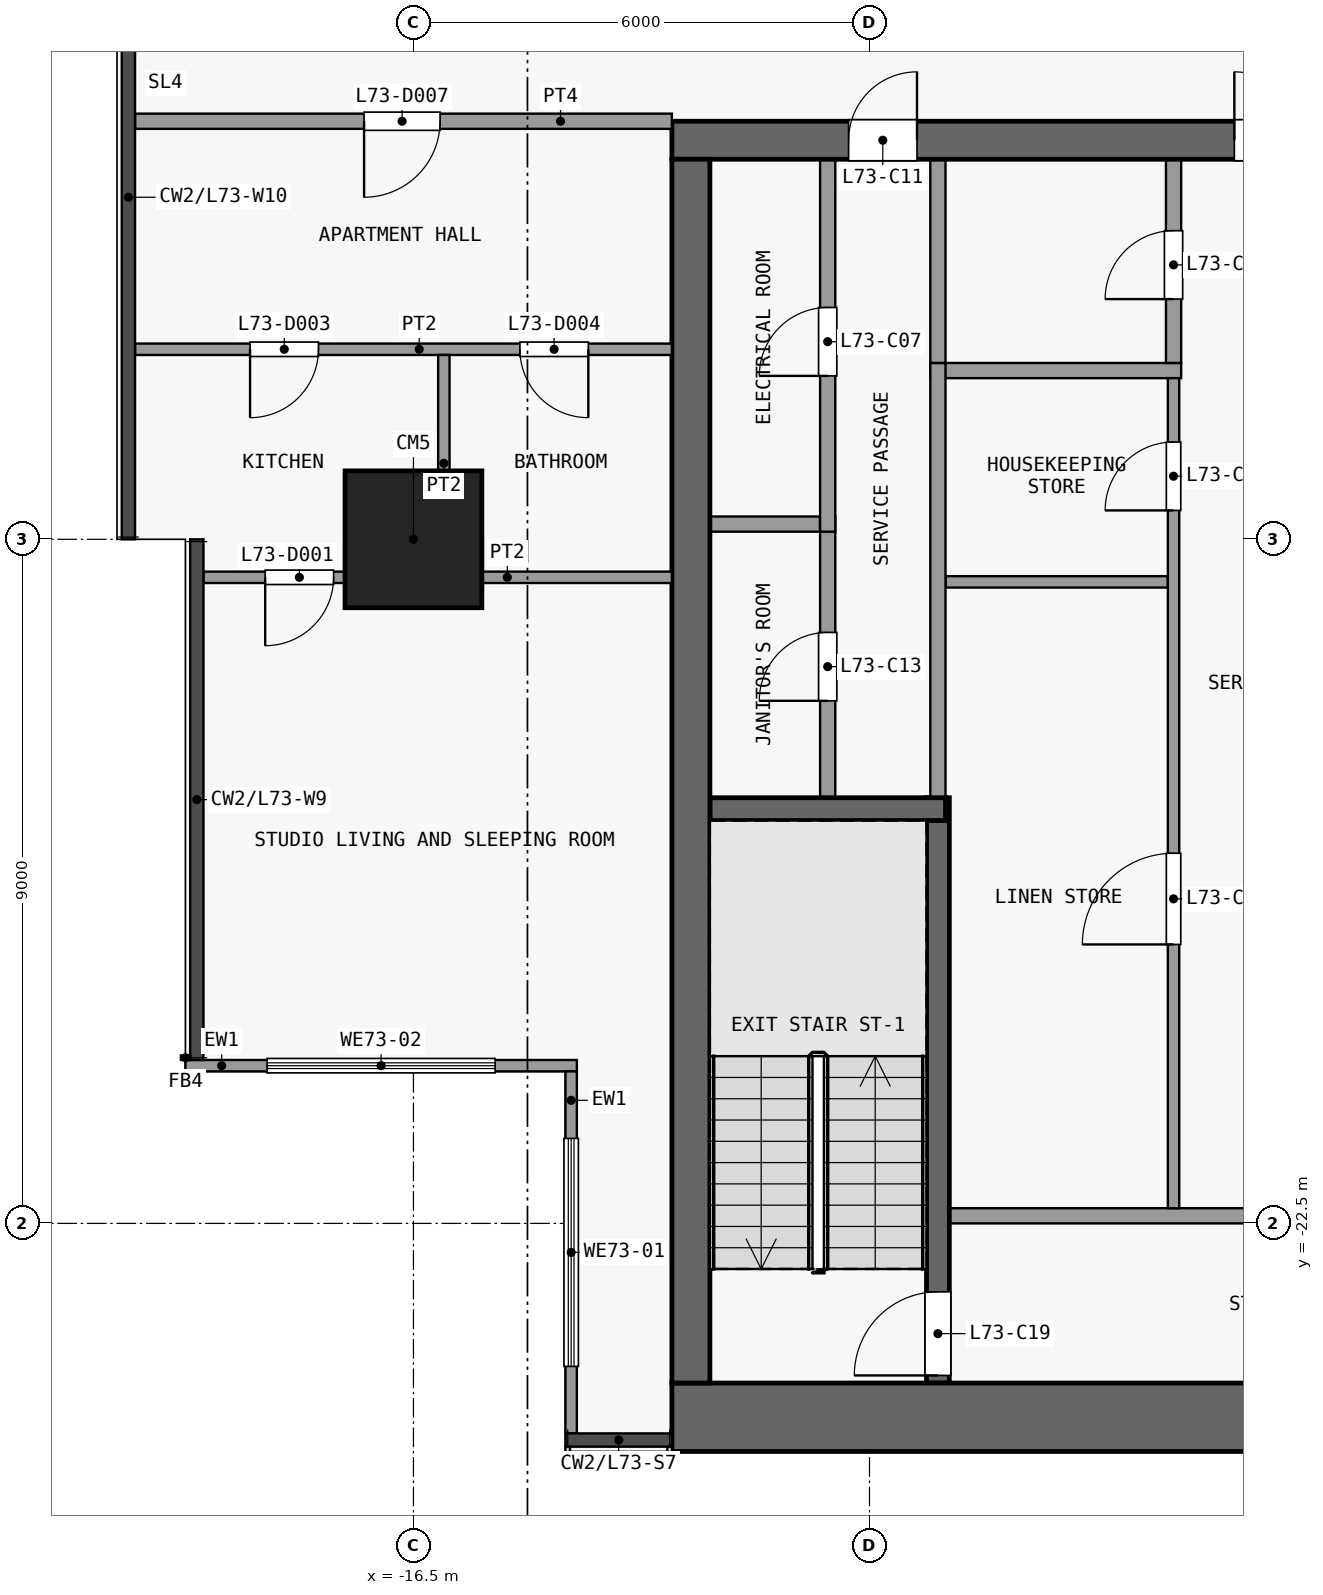
"""IFC4 building model, lengths in metres.
Left out: names, types, materials, properties, quantities, classifications, styles, units other than length and angle.
Written with IfcOpenShell. Run it as: python <this file> out.ifc"""

import sys

from ifc_helpers import new_model, si_unit, direction, frame, frame_2d, origin, origin_2d, place, context, subcontext, project, spatial, rectangle, extrude, element, fill, save


model = new_model("IFC4")
c1 = context("Model", 3, precision=1e-05, world=origin(), true_north=direction((0.0, 1.0)))
c2 = subcontext(c1, "Body", "Model", "MODEL_VIEW")
j1 = project(units=[si_unit("LENGTHUNIT", "METRE"), si_unit("PLANEANGLEUNIT", "RADIAN")], contexts=[c1])
p1 = place(None, origin())
s1 = spatial("IfcSite", under=j1, at=p1, CompositionType="ELEMENT")
p2 = place(p1, origin())
s2 = spatial("IfcBuilding", under=s1, at=p2, CompositionType="ELEMENT")
p3 = place(p2, frame((0.0, 0.0, 287.9)))
s3 = spatial("IfcBuildingStorey", under=s2, at=p3, CompositionType="ELEMENT", Elevation=287.9)
p4 = place(p3, frame((-16.5, -13.5, 0.0), z_axis=(0.0, 0.0, 1.0), x_axis=(1.0, 0.0, 0.0)))
e1 = element("IfcColumn", 1, at=p4, inside=s3, PredefinedType="COLUMN", context=c2, shape_type="SweptSolid", body=[
    extrude(rectangle(XDim=1.8, YDim=1.8, at=origin_2d()), origin(), (0.0, 0.0, 1.0), 3.6),
])
p5 = place(p3, frame((-13.1, -25.05, 0.0), z_axis=(0.0, 0.0, 1.0), x_axis=(1.0, 0.0, 0.0)))
e2 = element("IfcWall", 2, at=p5, inside=s3, PredefinedType="SHEAR", context=c2, shape_type="SweptSolid", body=[
    extrude(rectangle(XDim=26.2, YDim=0.9, at=frame_2d((13.1, 0.0))), origin(), (0.0, 0.0, 1.0), 3.3),
])
p6 = place(p3, frame((-13.1, -8.25, 0.0), z_axis=(0.0, 0.0, 1.0), x_axis=(1.0, 0.0, 0.0)))
e3 = element("IfcWall", 3, at=p6, inside=s3, PredefinedType="SHEAR", context=c2, shape_type="SweptSolid", body=[
    extrude(rectangle(XDim=26.2, YDim=0.5, at=frame_2d((13.1, 0.0))), origin(), (0.0, 0.0, 1.0), 3.3),
])
p7 = place(p6, frame((7.4, 0.0, 0.0)))
e4 = element("IfcOpeningElement", 4, at=p7, cuts=e3, PredefinedType="OPENING", context=c2, shape_type="SweptSolid", body=[
    extrude(rectangle(XDim=1.8, YDim=2.1, at=frame_2d((0.9, 1.05))), frame((0.0, 0.26, 0.0), z_axis=(0.0, -1.0, 0.0), x_axis=(1.0, 0.0, 0.0)), (0.0, 0.0, 1.0), 0.52),
])
p8 = place(p6, frame((17.0, 0.0, 0.0)))
e5 = element("IfcOpeningElement", 5, at=p8, cuts=e3, PredefinedType="OPENING", context=c2, shape_type="SweptSolid", body=[
    extrude(rectangle(XDim=1.8, YDim=2.1, at=frame_2d((0.9, 1.05))), frame((0.0, 0.26, 0.0), z_axis=(0.0, -1.0, 0.0), x_axis=(1.0, 0.0, 0.0)), (0.0, 0.0, 1.0), 0.52),
])
p9 = place(p6, frame((2.325, 0.0, 0.0)))
e6 = element("IfcOpeningElement", 6, at=p9, cuts=e3, PredefinedType="OPENING", context=c2, shape_type="SweptSolid", body=[
    extrude(rectangle(XDim=0.9, YDim=2.1, at=frame_2d((0.45, 1.05))), frame((0.0, 0.26, 0.0), z_axis=(0.0, -1.0, 0.0), x_axis=(1.0, 0.0, 0.0)), (0.0, 0.0, 1.0), 0.52),
])
p10 = place(p6, frame((22.975, 0.0, 0.0)))
e7 = element("IfcOpeningElement", 7, at=p10, cuts=e3, PredefinedType="OPENING", context=c2, shape_type="SweptSolid", body=[
    extrude(rectangle(XDim=0.9, YDim=2.1, at=frame_2d((0.45, 1.05))), frame((0.0, 0.26, 0.0), z_axis=(0.0, -1.0, 0.0), x_axis=(1.0, 0.0, 0.0)), (0.0, 0.0, 1.0), 0.52),
])
p11 = place(p3, frame((-12.85, -24.6, 0.0), z_axis=(0.0, 0.0, 1.0), x_axis=(0.0, 1.0, 0.0)))
e8 = element("IfcWall", 8, at=p11, inside=s3, PredefinedType="SHEAR", context=c2, shape_type="SweptSolid", body=[
    extrude(rectangle(XDim=16.1, YDim=0.5, at=frame_2d((8.05, 0.0))), origin(), (0.0, 0.0, 1.0), 3.3),
])
p12 = place(p3, frame((-3.25, -22.4, 0.0), z_axis=(0.0, 0.0, 1.0), x_axis=(-1.0, 0.0, 0.0)))
e9 = element("IfcWall", 9, at=p12, inside=s3, PredefinedType="PARTITIONING", context=c2, shape_type="SweptSolid", body=[
    extrude(rectangle(XDim=6.2, YDim=0.2, at=frame_2d((3.1, 0.0))), origin(), (0.0, 0.0, 1.0), 3.3),
])
p13 = place(p12, frame((0.8, 0.0, 0.0)))
e10 = element("IfcOpeningElement", 10, at=p13, cuts=e9, PredefinedType="OPENING", context=c2, shape_type="SweptSolid", body=[
    extrude(rectangle(XDim=1.5, YDim=2.1, at=frame_2d((0.75, 1.05))), frame((0.0, 0.11, 0.0), z_axis=(0.0, -1.0, 0.0), x_axis=(1.0, 0.0, 0.0)), (0.0, 0.0, 1.0), 0.22),
])
p14 = place(p3, frame((-12.6, -17.05, 0.0), z_axis=(0.0, 0.0, 1.0), x_axis=(1.0, 0.0, 0.0)))
e11 = element("IfcWall", 11, at=p14, inside=s3, PredefinedType="SHEAR", context=c2, shape_type="SweptSolid", body=[
    extrude(rectangle(XDim=3.1, YDim=0.3, at=frame_2d((1.55, 0.0))), origin(), (0.0, 0.0, 1.0), 3.3),
])
p15 = place(p3, frame((-9.5, -14.06, 0.0), z_axis=(0.0, 0.0, 1.0), x_axis=(1.0, 0.0, 0.0)))
e12 = element("IfcWall", 12, at=p15, inside=s3, PredefinedType="PARTITIONING", context=c2, shape_type="SweptSolid", body=[
    extrude(rectangle(XDim=2.925, YDim=0.15, at=frame_2d((1.462, 0.0))), origin(), (0.0, 0.0, 1.0), 3.3),
])
p16 = place(p3, frame((-12.6, -13.3, 0.0), z_axis=(0.0, 0.0, 1.0), x_axis=(1.0, 0.0, 0.0)))
e13 = element("IfcWall", 13, at=p16, inside=s3, PredefinedType="PARTITIONING", context=c2, shape_type="SweptSolid", body=[
    extrude(rectangle(XDim=1.45, YDim=0.2, at=frame_2d((0.725, 0.0))), origin(), (0.0, 0.0, 1.0), 3.3),
])
p17 = place(p3, frame((-9.7, -11.28, 0.0), z_axis=(0.0, 0.0, 1.0), x_axis=(1.0, 0.0, 0.0)))
e14 = element("IfcWall", 14, at=p17, inside=s3, PredefinedType="PARTITIONING", context=c2, shape_type="SweptSolid", body=[
    extrude(rectangle(XDim=3.3, YDim=0.2, at=frame_2d((1.65, 0.0))), origin(), (0.0, 0.0, 1.0), 3.3),
])
p18 = place(p3, frame((-11.05, -16.9, 0.0), z_axis=(0.0, 0.0, 1.0), x_axis=(0.0, 1.0, 0.0)))
e15 = element("IfcWall", 15, at=p18, inside=s3, PredefinedType="PARTITIONING", context=c2, shape_type="SweptSolid", body=[
    extrude(rectangle(XDim=3.7, YDim=0.2, at=frame_2d((1.85, 0.0))), origin(), (0.0, 0.0, 1.0), 3.3),
])
p19 = place(p18, frame((1.275, 0.0, 0.0)))
e16 = element("IfcOpeningElement", 16, at=p19, cuts=e15, PredefinedType="OPENING", context=c2, shape_type="SweptSolid", body=[
    extrude(rectangle(XDim=0.9, YDim=2.1, at=frame_2d((0.45, 1.05))), frame((0.0, 0.11, 0.0), z_axis=(0.0, -1.0, 0.0), x_axis=(1.0, 0.0, 0.0)), (0.0, 0.0, 1.0), 0.22),
])
p20 = place(p3, frame((-11.05, -13.4, 0.0), z_axis=(0.0, 0.0, 1.0), x_axis=(0.0, 1.0, 0.0)))
e17 = element("IfcWall", 17, at=p20, inside=s3, PredefinedType="PARTITIONING", context=c2, shape_type="SweptSolid", body=[
    extrude(rectangle(XDim=4.9, YDim=0.2, at=frame_2d((2.45, 0.0))), origin(), (0.0, 0.0, 1.0), 3.3),
])
p21 = place(p20, frame((2.05, 0.0, 0.0)))
e18 = element("IfcOpeningElement", 18, at=p21, cuts=e17, PredefinedType="OPENING", context=c2, shape_type="SweptSolid", body=[
    extrude(rectangle(XDim=0.9, YDim=2.1, at=frame_2d((0.45, 1.05))), frame((0.0, 0.11, 0.0), z_axis=(0.0, -1.0, 0.0), x_axis=(1.0, 0.0, 0.0)), (0.0, 0.0, 1.0), 0.22),
])
p22 = place(p3, frame((-9.6, -24.6, 0.0), z_axis=(0.0, 0.0, 1.0), x_axis=(0.0, 1.0, 0.0)))
e19 = element("IfcWall", 19, at=p22, inside=s3, PredefinedType="SHEAR", context=c2, shape_type="SweptSolid", body=[
    extrude(rectangle(XDim=7.7, YDim=0.3, at=frame_2d((3.85, 0.0))), origin(), (0.0, 0.0, 1.0), 3.3),
])
p23 = place(p22, frame((0.1, 0.0, 0.0)))
e20 = element("IfcOpeningElement", 20, at=p23, cuts=e19, PredefinedType="OPENING", context=c2, shape_type="SweptSolid", body=[
    extrude(rectangle(XDim=1.1, YDim=2.1, at=frame_2d((0.55, 1.05))), frame((0.0, 0.16, 0.0), z_axis=(0.0, -1.0, 0.0), x_axis=(1.0, 0.0, 0.0)), (0.0, 0.0, 1.0), 0.32),
])
p24 = place(p3, frame((-9.6, -16.9, 0.0), z_axis=(0.0, 0.0, 1.0), x_axis=(0.0, 1.0, 0.0)))
e21 = element("IfcWall", 21, at=p24, inside=s3, PredefinedType="PARTITIONING", context=c2, shape_type="SweptSolid", body=[
    extrude(rectangle(XDim=5.72, YDim=0.2, at=frame_2d((2.86, 0.0))), origin(), (0.0, 0.0, 1.0), 3.3),
])
p25 = place(p3, frame((-9.6, -11.18, 0.0), z_axis=(0.0, 0.0, 1.0), x_axis=(0.0, 1.0, 0.0)))
e22 = element("IfcWall", 22, at=p25, inside=s3, PredefinedType="PARTITIONING", context=c2, shape_type="SweptSolid", body=[
    extrude(rectangle(XDim=2.68, YDim=0.2, at=frame_2d((1.34, 0.0))), origin(), (0.0, 0.0, 1.0), 3.3),
])
p26 = place(p3, frame((-6.5, -22.3, 0.0), z_axis=(0.0, 0.0, 1.0), x_axis=(0.0, 1.0, 0.0)))
e23 = element("IfcWall", 23, at=p26, inside=s3, PredefinedType="PARTITIONING", context=c2, shape_type="SweptSolid", body=[
    extrude(rectangle(XDim=10.92, YDim=0.15, at=frame_2d((5.46, 0.0))), origin(), (0.0, 0.0, 1.0), 3.3),
])
p27 = place(p26, frame((3.47, 0.0, 0.0)))
e24 = element("IfcOpeningElement", 24, at=p27, cuts=e23, PredefinedType="OPENING", context=c2, shape_type="SweptSolid", body=[
    extrude(rectangle(XDim=1.2, YDim=2.1, at=frame_2d((0.6, 1.05))), frame((0.0, 0.085, 0.0), z_axis=(0.0, -1.0, 0.0), x_axis=(1.0, 0.0, 0.0)), (0.0, 0.0, 1.0), 0.17),
])
p28 = place(p26, frame((9.18, 0.0, 0.0)))
e25 = element("IfcOpeningElement", 25, at=p28, cuts=e23, PredefinedType="OPENING", context=c2, shape_type="SweptSolid", body=[
    extrude(rectangle(XDim=0.9, YDim=2.1, at=frame_2d((0.45, 1.05))), frame((0.0, 0.085, 0.0), z_axis=(0.0, -1.0, 0.0), x_axis=(1.0, 0.0, 0.0)), (0.0, 0.0, 1.0), 0.17),
])
p29 = place(p3, frame((-6.5, -11.18, 0.0), z_axis=(0.0, 0.0, 1.0), x_axis=(0.0, 1.0, 0.0)))
e26 = element("IfcWall", 26, at=p29, inside=s3, PredefinedType="PARTITIONING", context=c2, shape_type="SweptSolid", body=[
    extrude(rectangle(XDim=2.68, YDim=0.2, at=frame_2d((1.34, 0.0))), origin(), (0.0, 0.0, 1.0), 3.3),
])
p30 = place(p29, frame((0.84, 0.0, 0.0)))
e27 = element("IfcOpeningElement", 27, at=p30, cuts=e26, PredefinedType="OPENING", context=c2, shape_type="SweptSolid", body=[
    extrude(rectangle(XDim=0.9, YDim=2.1, at=frame_2d((0.45, 1.05))), frame((0.0, 0.11, 0.0), z_axis=(0.0, -1.0, 0.0), x_axis=(1.0, 0.0, 0.0)), (0.0, 0.0, 1.0), 0.22),
])
p31 = place(p3, frame((-14.425, -25.262, 0.0), z_axis=(0.0, 0.0, 1.0), x_axis=(0.0, 1.0, 0.0)))
e28 = element("IfcWall", 28, at=p31, inside=s3, PredefinedType="SOLIDWALL", context=c2, shape_type="SweptSolid", body=[
    extrude(rectangle(XDim=4.762, YDim=0.15, at=frame_2d((2.381, 0.0))), origin(), (0.0, 0.0, 1.0), 3.3),
])
p32 = place(p31, frame((0.881, 0.0, 0.9)))
e29 = element("IfcOpeningElement", 29, at=p32, cuts=e28, PredefinedType="OPENING", context=c2, shape_type="SweptSolid", body=[
    extrude(rectangle(XDim=3.0, YDim=2.4, at=frame_2d((1.5, 1.2))), frame((0.0, 0.085, 0.0), z_axis=(0.0, -1.0, 0.0), x_axis=(1.0, 0.0, 0.0)), (0.0, 0.0, 1.0), 0.17),
])
p33 = place(p3, frame((-14.35, -20.425, 0.0), z_axis=(0.0, 0.0, 1.0), x_axis=(-1.0, 0.0, 0.0)))
e30 = element("IfcWall", 30, at=p33, inside=s3, PredefinedType="SOLIDWALL", context=c2, shape_type="SweptSolid", body=[
    extrude(rectangle(XDim=5.15, YDim=0.15, at=frame_2d((2.575, 0.0))), origin(), (0.0, 0.0, 1.0), 3.3),
])
p34 = place(p33, frame((1.075, 0.0, 0.9)))
e31 = element("IfcOpeningElement", 31, at=p34, cuts=e30, PredefinedType="OPENING", context=c2, shape_type="SweptSolid", body=[
    extrude(rectangle(XDim=3.0, YDim=2.4, at=frame_2d((1.5, 1.2))), frame((0.0, 0.085, 0.0), z_axis=(0.0, -1.0, 0.0), x_axis=(1.0, 0.0, 0.0)), (0.0, 0.0, 1.0), 0.17),
])
p35 = place(p3, frame((-19.262, -14.0, 0.0), z_axis=(0.0, 0.0, 1.0), x_axis=(1.0, 0.0, 0.0)))
e32 = element("IfcWall", 32, at=p35, inside=s3, PredefinedType="PARTITIONING", context=c2, shape_type="SweptSolid", body=[
    extrude(rectangle(XDim=6.162, YDim=0.15, at=frame_2d((3.081, 0.0))), origin(), (0.0, 0.0, 1.0), 3.3),
])
p36 = place(p35, frame((0.812, 0.0, 0.0)))
e33 = element("IfcOpeningElement", 33, at=p36, cuts=e32, PredefinedType="OPENING", context=c2, shape_type="SweptSolid", body=[
    extrude(rectangle(XDim=0.9, YDim=2.1, at=frame_2d((0.45, 1.05))), frame((0.0, 0.085, 0.0), z_axis=(0.0, -1.0, 0.0), x_axis=(1.0, 0.0, 0.0)), (0.0, 0.0, 1.0), 0.17),
])
p37 = place(p3, frame((-20.163, -11.0, 0.0), z_axis=(0.0, 0.0, 1.0), x_axis=(1.0, 0.0, 0.0)))
e34 = element("IfcWall", 34, at=p37, inside=s3, PredefinedType="PARTITIONING", context=c2, shape_type="SweptSolid", body=[
    extrude(rectangle(XDim=7.062, YDim=0.15, at=frame_2d((3.531, 0.0))), origin(), (0.0, 0.0, 1.0), 3.3),
])
p38 = place(p37, frame((1.513, 0.0, 0.0)))
e35 = element("IfcOpeningElement", 35, at=p38, cuts=e34, PredefinedType="OPENING", context=c2, shape_type="SweptSolid", body=[
    extrude(rectangle(XDim=0.9, YDim=2.1, at=frame_2d((0.45, 1.05))), frame((0.0, 0.085, 0.0), z_axis=(0.0, -1.0, 0.0), x_axis=(1.0, 0.0, 0.0)), (0.0, 0.0, 1.0), 0.17),
])
p39 = place(p37, frame((5.063, 0.0, 0.0)))
e36 = element("IfcOpeningElement", 36, at=p39, cuts=e34, PredefinedType="OPENING", context=c2, shape_type="SweptSolid", body=[
    extrude(rectangle(XDim=0.9, YDim=2.1, at=frame_2d((0.45, 1.05))), frame((0.0, 0.085, 0.0), z_axis=(0.0, -1.0, 0.0), x_axis=(1.0, 0.0, 0.0)), (0.0, 0.0, 1.0), 0.17),
])
p40 = place(p3, frame((-20.163, -8.0, 0.0), z_axis=(0.0, 0.0, 1.0), x_axis=(1.0, 0.0, 0.0)))
e37 = element("IfcWall", 37, at=p40, inside=s3, PredefinedType="PARTITIONING", context=c2, shape_type="SweptSolid", body=[
    extrude(rectangle(XDim=7.062, YDim=0.2, at=frame_2d((3.531, 0.0))), origin(), (0.0, 0.0, 1.0), 3.3),
])
p41 = place(p40, frame((3.013, 0.0, 0.0)))
e38 = element("IfcOpeningElement", 38, at=p41, cuts=e37, PredefinedType="OPENING", context=c2, shape_type="SweptSolid", body=[
    extrude(rectangle(XDim=1.0, YDim=2.1, at=frame_2d((0.5, 1.05))), frame((0.0, 0.11, 0.0), z_axis=(0.0, -1.0, 0.0), x_axis=(1.0, 0.0, 0.0)), (0.0, 0.0, 1.0), 0.22),
])
p42 = place(p3, frame((-16.1, -13.925, 0.0), z_axis=(0.0, 0.0, 1.0), x_axis=(0.0, 1.0, 0.0)))
e39 = element("IfcWall", 39, at=p42, inside=s3, PredefinedType="PARTITIONING", context=c2, shape_type="SweptSolid", body=[
    extrude(rectangle(XDim=2.85, YDim=0.15, at=frame_2d((1.425, 0.0))), origin(), (0.0, 0.0, 1.0), 3.3),
])
p43 = place(p7, origin())
e40 = element("IfcDoor", 40, at=p43, inside=s3, OperationType="DOUBLE_DOOR_SINGLE_SWING", PredefinedType="DOOR", context=c2, shape_type="SweptSolid", body=[
    extrude(rectangle(XDim=1.8, YDim=2.1, at=frame_2d((0.9, 1.05))), frame((0.0, 0.025, 0.0), z_axis=(0.0, -1.0, 0.0), x_axis=(1.0, 0.0, 0.0)), (0.0, 0.0, 1.0), 0.05),
])
fill(e4, e40)
p44 = place(p21, origin())
e41 = element("IfcDoor", 41, at=p44, inside=s3, OperationType="SINGLE_SWING_LEFT", PredefinedType="DOOR", context=c2, shape_type="SweptSolid", body=[
    extrude(rectangle(XDim=0.9, YDim=2.1, at=frame_2d((0.45, 1.05))), frame((0.0, 0.025, 0.0), z_axis=(0.0, -1.0, 0.0), x_axis=(1.0, 0.0, 0.0)), (0.0, 0.0, 1.0), 0.05),
])
fill(e18, e41)
p45 = place(p30, origin())
e42 = element("IfcDoor", 42, at=p45, inside=s3, OperationType="SINGLE_SWING_LEFT", PredefinedType="DOOR", context=c2, shape_type="SweptSolid", body=[
    extrude(rectangle(XDim=0.9, YDim=2.1, at=frame_2d((0.45, 1.05))), frame((0.0, 0.025, 0.0), z_axis=(0.0, -1.0, 0.0), x_axis=(1.0, 0.0, 0.0)), (0.0, 0.0, 1.0), 0.05),
])
fill(e27, e42)
p46 = place(p9, origin())
e43 = element("IfcDoor", 43, at=p46, inside=s3, OperationType="SINGLE_SWING_RIGHT", PredefinedType="DOOR", context=c2, shape_type="SweptSolid", body=[
    extrude(rectangle(XDim=0.9, YDim=2.1, at=frame_2d((0.45, 1.05))), frame((0.0, 0.025, 0.0), z_axis=(0.0, -1.0, 0.0), x_axis=(1.0, 0.0, 0.0)), (0.0, 0.0, 1.0), 0.05),
])
fill(e6, e43)
p47 = place(p19, origin())
e44 = element("IfcDoor", 44, at=p47, inside=s3, OperationType="SINGLE_SWING_LEFT", PredefinedType="DOOR", context=c2, shape_type="SweptSolid", body=[
    extrude(rectangle(XDim=0.9, YDim=2.1, at=frame_2d((0.45, 1.05))), frame((0.0, 0.025, 0.0), z_axis=(0.0, -1.0, 0.0), x_axis=(1.0, 0.0, 0.0)), (0.0, 0.0, 1.0), 0.05),
])
fill(e16, e44)
p48 = place(p27, origin())
e45 = element("IfcDoor", 45, at=p48, inside=s3, OperationType="SINGLE_SWING_LEFT", PredefinedType="DOOR", context=c2, shape_type="SweptSolid", body=[
    extrude(rectangle(XDim=1.2, YDim=2.1, at=frame_2d((0.6, 1.05))), frame((0.0, 0.025, 0.0), z_axis=(0.0, -1.0, 0.0), x_axis=(1.0, 0.0, 0.0)), (0.0, 0.0, 1.0), 0.05),
])
fill(e24, e45)
p49 = place(p28, origin())
e46 = element("IfcDoor", 46, at=p49, inside=s3, OperationType="SINGLE_SWING_LEFT", PredefinedType="DOOR", context=c2, shape_type="SweptSolid", body=[
    extrude(rectangle(XDim=0.9, YDim=2.1, at=frame_2d((0.45, 1.05))), frame((0.0, 0.025, 0.0), z_axis=(0.0, -1.0, 0.0), x_axis=(1.0, 0.0, 0.0)), (0.0, 0.0, 1.0), 0.05),
])
fill(e25, e46)
p50 = place(p23, origin())
e47 = element("IfcDoor", 47, at=p50, inside=s3, OperationType="SINGLE_SWING_LEFT", PredefinedType="DOOR", context=c2, shape_type="SweptSolid", body=[
    extrude(rectangle(XDim=1.1, YDim=2.1, at=frame_2d((0.55, 1.05))), frame((0.0, 0.025, 0.0), z_axis=(0.0, -1.0, 0.0), x_axis=(1.0, 0.0, 0.0)), (0.0, 0.0, 1.0), 0.05),
])
fill(e20, e47)
p51 = place(p32, origin())
e48 = element("IfcWindow", 48, at=p51, inside=s3, PartitioningType="SINGLE_PANEL", PredefinedType="WINDOW", context=c2, shape_type="SweptSolid", body=[
    extrude(rectangle(XDim=3.0, YDim=2.4, at=frame_2d((1.5, 1.2))), frame((0.0, 0.03, 0.0), z_axis=(0.0, -1.0, 0.0), x_axis=(1.0, 0.0, 0.0)), (0.0, 0.0, 1.0), 0.06),
])
fill(e29, e48)
p52 = place(p34, origin())
e49 = element("IfcWindow", 49, at=p52, inside=s3, PartitioningType="SINGLE_PANEL", PredefinedType="WINDOW", context=c2, shape_type="SweptSolid", body=[
    extrude(rectangle(XDim=3.0, YDim=2.4, at=frame_2d((1.5, 1.2))), frame((0.0, 0.03, 0.0), z_axis=(0.0, -1.0, 0.0), x_axis=(1.0, 0.0, 0.0)), (0.0, 0.0, 1.0), 0.06),
])
fill(e31, e49)
p53 = place(p36, origin())
e50 = element("IfcDoor", 50, at=p53, inside=s3, OperationType="SINGLE_SWING_LEFT", PredefinedType="DOOR", context=c2, shape_type="SweptSolid", body=[
    extrude(rectangle(XDim=0.9, YDim=2.1, at=frame_2d((0.45, 1.05))), frame((0.0, 0.025, 0.0), z_axis=(0.0, -1.0, 0.0), x_axis=(1.0, 0.0, 0.0)), (0.0, 0.0, 1.0), 0.05),
])
fill(e33, e50)
p54 = place(p38, origin())
e51 = element("IfcDoor", 51, at=p54, inside=s3, OperationType="SINGLE_SWING_LEFT", PredefinedType="DOOR", context=c2, shape_type="SweptSolid", body=[
    extrude(rectangle(XDim=0.9, YDim=2.1, at=frame_2d((0.45, 1.05))), frame((0.0, 0.025, 0.0), z_axis=(0.0, -1.0, 0.0), x_axis=(1.0, 0.0, 0.0)), (0.0, 0.0, 1.0), 0.05),
])
fill(e35, e51)
p55 = place(p39, origin())
e52 = element("IfcDoor", 52, at=p55, inside=s3, OperationType="SINGLE_SWING_RIGHT", PredefinedType="DOOR", context=c2, shape_type="SweptSolid", body=[
    extrude(rectangle(XDim=0.9, YDim=2.1, at=frame_2d((0.45, 1.05))), frame((0.0, 0.025, 0.0), z_axis=(0.0, -1.0, 0.0), x_axis=(1.0, 0.0, 0.0)), (0.0, 0.0, 1.0), 0.05),
])
fill(e36, e52)
p56 = place(p41, origin())
e53 = element("IfcDoor", 53, at=p56, inside=s3, OperationType="SINGLE_SWING_LEFT", PredefinedType="DOOR", context=c2, shape_type="SweptSolid", body=[
    extrude(rectangle(XDim=1.0, YDim=2.1, at=frame_2d((0.5, 1.05))), frame((0.0, 0.025, 0.0), z_axis=(0.0, -1.0, 0.0), x_axis=(1.0, 0.0, 0.0)), (0.0, 0.0, 1.0), 0.05),
])
fill(e38, e53)
save(model, sys.argv[1])
